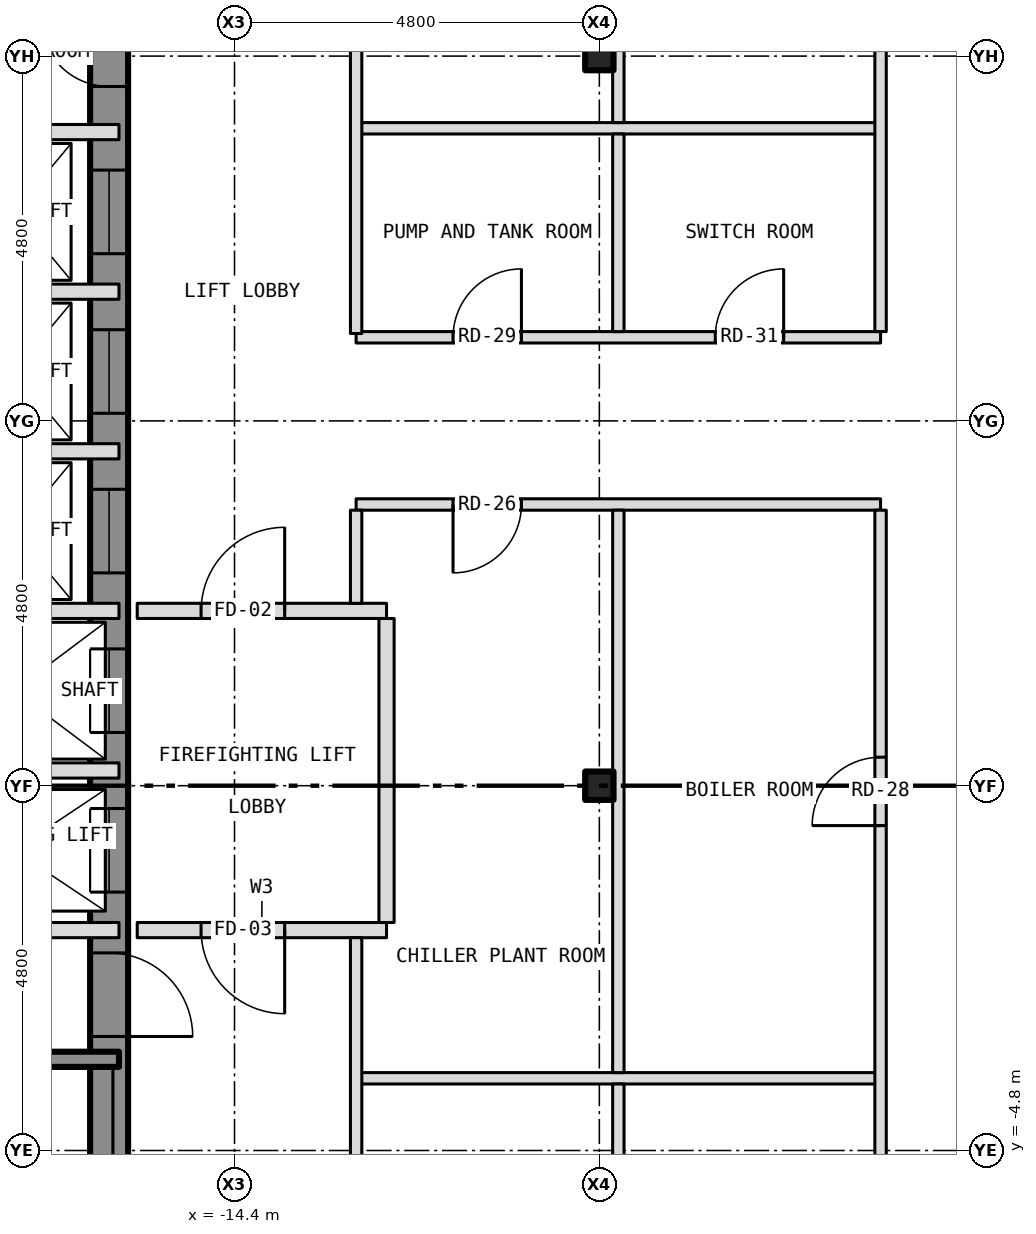
"""IFC4 building model, lengths in metres.
Left out: names, types, materials, properties, quantities, classifications, styles, units other than length and angle.
Written with IfcOpenShell. Run it as: python <this file> out.ifc"""

import sys

from ifc_helpers import new_model, si_unit, direction, frame, frame_2d, origin, origin_2d, place, context, subcontext, project, spatial, rectangle, i_section, extrude, element, fill, save


model = new_model("IFC4")
c1 = context("Model", 3, precision=1e-05, world=origin(), true_north=direction((0.0, 1.0)))
c2 = subcontext(c1, "Body", "Model", "MODEL_VIEW")
j1 = project(units=[si_unit("LENGTHUNIT", "METRE"), si_unit("PLANEANGLEUNIT", "RADIAN")], contexts=[c1])
p1 = place(None, origin())
s1 = spatial("IfcSite", under=j1, at=p1, CompositionType="ELEMENT")
p2 = place(p1, origin())
s2 = spatial("IfcBuilding", under=s1, at=p2, CompositionType="ELEMENT")
p3 = place(p2, frame((0.0, 0.0, 186.5)))
s3 = spatial("IfcBuildingStorey", under=s2, at=p3, CompositionType="ELEMENT", Elevation=186.5)
for number, where, z_axis, x_axis in (
    (1, (-9.6, 0.0, -0.3), (0.0, 0.0, 1.0), (1.0, 0.0, 0.0)),
    (2, (-9.6, 9.6, -0.3), (0.0, 0.0, 1.0), (1.0, 0.0, 0.0)),
):
    element("IfcColumn", number, at=place(p3, frame(where, z_axis=z_axis, x_axis=x_axis)), inside=s3, PredefinedType="COLUMN", context=c2, shape_type="SweptSolid", body=[
        extrude(i_section(OverallWidth=0.373, OverallDepth=0.373, WebThickness=0.016, FlangeThickness=0.026, at=origin_2d()), origin(), (0.0, 0.0, 1.0), 4.65),
    ])
p4 = place(p3, frame((-16.05, -10.8, 0.0), z_axis=(0.0, 0.0, 1.0), x_axis=(0.0, 1.0, 0.0)))
e3 = element("IfcWall", 3, at=p4, inside=s3, PredefinedType="SHEAR", context=c2, shape_type="SweptSolid", body=[
    extrude(rectangle(XDim=21.6, YDim=0.5, at=frame_2d((10.8, 0.0))), origin(), (0.0, 0.0, 1.0), 3.9),
])
p5 = place(p4, frame((9.4, 0.0, 0.0)))
e4 = element("IfcOpeningElement", 4, at=p5, cuts=e3, PredefinedType="OPENING", context=c2, shape_type="SweptSolid", body=[
    extrude(rectangle(XDim=1.1, YDim=2.1, at=frame_2d((0.55, 1.05))), frame((0.0, 0.262, 0.0), z_axis=(0.0, -1.0, 0.0), x_axis=(1.0, 0.0, 0.0)), (0.0, 0.0, 1.0), 0.524),
])
p6 = place(p4, frame((11.5, 0.0, 0.0)))
e5 = element("IfcOpeningElement", 5, at=p6, cuts=e3, PredefinedType="OPENING", context=c2, shape_type="SweptSolid", body=[
    extrude(rectangle(XDim=1.1, YDim=2.1, at=frame_2d((0.55, 1.05))), frame((0.0, 0.262, 0.0), z_axis=(0.0, -1.0, 0.0), x_axis=(1.0, 0.0, 0.0)), (0.0, 0.0, 1.0), 0.524),
])
p7 = place(p4, frame((13.6, 0.0, 0.0)))
e6 = element("IfcOpeningElement", 6, at=p7, cuts=e3, PredefinedType="OPENING", context=c2, shape_type="SweptSolid", body=[
    extrude(rectangle(XDim=1.1, YDim=2.1, at=frame_2d((0.55, 1.05))), frame((0.0, 0.262, 0.0), z_axis=(0.0, -1.0, 0.0), x_axis=(1.0, 0.0, 0.0)), (0.0, 0.0, 1.0), 0.524),
])
p8 = place(p4, frame((15.7, 0.0, 0.0)))
e7 = element("IfcOpeningElement", 7, at=p8, cuts=e3, PredefinedType="OPENING", context=c2, shape_type="SweptSolid", body=[
    extrude(rectangle(XDim=1.1, YDim=2.1, at=frame_2d((0.55, 1.05))), frame((0.0, 0.262, 0.0), z_axis=(0.0, -1.0, 0.0), x_axis=(1.0, 0.0, 0.0)), (0.0, 0.0, 1.0), 0.524),
])
p9 = place(p4, frame((17.8, 0.0, 0.0)))
e8 = element("IfcOpeningElement", 8, at=p9, cuts=e3, PredefinedType="OPENING", context=c2, shape_type="SweptSolid", body=[
    extrude(rectangle(XDim=1.1, YDim=2.1, at=frame_2d((0.55, 1.05))), frame((0.0, 0.262, 0.0), z_axis=(0.0, -1.0, 0.0), x_axis=(1.0, 0.0, 0.0)), (0.0, 0.0, 1.0), 0.524),
])
p10 = place(p4, frame((0.758, 0.0, 0.0)))
e9 = element("IfcOpeningElement", 9, at=p10, cuts=e3, PredefinedType="OPENING", context=c2, shape_type="SweptSolid", body=[
    extrude(rectangle(XDim=1.1, YDim=2.1, at=frame_2d((0.55, 1.05))), frame((0.0, 0.262, 0.0), z_axis=(0.0, -1.0, 0.0), x_axis=(1.0, 0.0, 0.0)), (0.0, 0.0, 1.0), 0.524),
])
p11 = place(p4, frame((7.5, 0.0, 0.0)))
e10 = element("IfcOpeningElement", 10, at=p11, cuts=e3, PredefinedType="OPENING", context=c2, shape_type="SweptSolid", body=[
    extrude(rectangle(XDim=1.1, YDim=2.1, at=frame_2d((0.55, 1.05))), frame((0.0, 0.262, 0.0), z_axis=(0.0, -1.0, 0.0), x_axis=(1.0, 0.0, 0.0)), (0.0, 0.0, 1.0), 0.524),
])
p12 = place(p4, frame((20.0, 0.0, 0.0)))
e11 = element("IfcOpeningElement", 11, at=p12, cuts=e3, PredefinedType="OPENING", context=c2, shape_type="SweptSolid", body=[
    extrude(rectangle(XDim=0.9, YDim=2.1, at=frame_2d((0.45, 1.05))), frame((0.0, 0.262, 0.0), z_axis=(0.0, -1.0, 0.0), x_axis=(1.0, 0.0, 0.0)), (0.0, 0.0, 1.0), 0.524),
])
p13 = place(p3, frame((-12.8, -3.85, 0.0), z_axis=(0.0, 0.0, 1.0), x_axis=(1.0, 0.0, 0.0)))
e12 = element("IfcWall", 12, at=p13, inside=s3, PredefinedType="PARTITIONING", context=c2, shape_type="SweptSolid", body=[
    extrude(rectangle(XDim=6.9, YDim=0.15, at=frame_2d((3.45, 0.0))), origin(), (0.0, 0.0, 1.0), 4.35),
])
p14 = place(p3, frame((-20.0, -3.6, 0.0), z_axis=(0.0, 0.0, 1.0), x_axis=(1.0, 0.0, 0.0)))
e13 = element("IfcWall", 13, at=p14, inside=s3, PredefinedType="SHEAR", context=c2, shape_type="SweptSolid", body=[
    extrude(rectangle(XDim=4.08, YDim=0.2, at=frame_2d((2.04, 0.0))), origin(), (0.0, 0.0, 1.0), 3.9),
])
p15 = place(p3, frame((-21.48, -1.9, 0.0), z_axis=(0.0, 0.0, 1.0), x_axis=(1.0, 0.0, 0.0)))
e14 = element("IfcWall", 14, at=p15, inside=s3, PredefinedType="PARTITIONING", context=c2, shape_type="SweptSolid", body=[
    extrude(rectangle(XDim=5.56, YDim=0.2, at=frame_2d((2.78, 0.0))), origin(), (0.0, 0.0, 1.0), 3.9),
])
p16 = place(p15, frame((0.83, 0.0, 0.0)))
e15 = element("IfcOpeningElement", 15, at=p16, cuts=e14, PredefinedType="OPENING", context=c2, shape_type="SweptSolid", body=[
    extrude(rectangle(XDim=0.9, YDim=2.1, at=frame_2d((0.45, 1.05))), frame((0.0, 0.112, 0.0), z_axis=(0.0, -1.0, 0.0), x_axis=(1.0, 0.0, 0.0)), (0.0, 0.0, 1.0), 0.224),
])
p17 = place(p3, frame((-15.68, -1.9, 0.0), z_axis=(0.0, 0.0, 1.0), x_axis=(1.0, 0.0, 0.0)))
e16 = element("IfcWall", 16, at=p17, inside=s3, PredefinedType="PARTITIONING", context=c2, shape_type="SweptSolid", body=[
    extrude(rectangle(XDim=3.28, YDim=0.2, at=frame_2d((1.64, 0.0))), origin(), (0.0, 0.0, 1.0), 4.35),
])
p18 = place(p17, frame((0.84, 0.0, 0.0)))
e17 = element("IfcOpeningElement", 17, at=p18, cuts=e16, PredefinedType="OPENING", context=c2, shape_type="SweptSolid", body=[
    extrude(rectangle(XDim=1.1, YDim=2.1, at=frame_2d((0.55, 1.05))), frame((0.0, 0.112, 0.0), z_axis=(0.0, -1.0, 0.0), x_axis=(1.0, 0.0, 0.0)), (0.0, 0.0, 1.0), 0.224),
])
for number, where, z_axis, x_axis in (
    (18, (-18.8, 0.2, 0.0), (0.0, 0.0, 1.0), (1.0, 0.0, 0.0)),
    (19, (-18.8, 2.3, 0.0), (0.0, 0.0, 1.0), (1.0, 0.0, 0.0)),
):
    element("IfcWall", number, at=place(p3, frame(where, z_axis=z_axis, x_axis=x_axis)), inside=s3, PredefinedType="PARTITIONING", context=c2, shape_type="SweptSolid", body=[
        extrude(rectangle(XDim=2.88, YDim=0.2, at=frame_2d((1.44, 0.0))), origin(), (0.0, 0.0, 1.0), 3.9),
    ])
p19 = place(p3, frame((-15.68, 2.3, 0.0), z_axis=(0.0, 0.0, 1.0), x_axis=(1.0, 0.0, 0.0)))
e20 = element("IfcWall", 20, at=p19, inside=s3, PredefinedType="PARTITIONING", context=c2, shape_type="SweptSolid", body=[
    extrude(rectangle(XDim=3.28, YDim=0.2, at=frame_2d((1.64, 0.0))), origin(), (0.0, 0.0, 1.0), 4.35),
])
p20 = place(p19, frame((0.84, 0.0, 0.0)))
e21 = element("IfcOpeningElement", 21, at=p20, cuts=e20, PredefinedType="OPENING", context=c2, shape_type="SweptSolid", body=[
    extrude(rectangle(XDim=1.1, YDim=2.1, at=frame_2d((0.55, 1.05))), frame((0.0, 0.112, 0.0), z_axis=(0.0, -1.0, 0.0), x_axis=(1.0, 0.0, 0.0)), (0.0, 0.0, 1.0), 0.224),
])
p21 = place(p3, frame((-12.8, 3.7, 0.0), z_axis=(0.0, 0.0, 1.0), x_axis=(1.0, 0.0, 0.0)))
e22 = element("IfcWall", 22, at=p21, inside=s3, PredefinedType="PARTITIONING", context=c2, shape_type="SweptSolid", body=[
    extrude(rectangle(XDim=6.9, YDim=0.15, at=frame_2d((3.45, 0.0))), origin(), (0.0, 0.0, 1.0), 4.35),
])
p22 = place(p21, frame((1.275, 0.0, 0.0)))
e23 = element("IfcOpeningElement", 23, at=p22, cuts=e22, PredefinedType="OPENING", context=c2, shape_type="SweptSolid", body=[
    extrude(rectangle(XDim=0.9, YDim=2.1, at=frame_2d((0.45, 1.05))), frame((0.0, 0.087, 0.0), z_axis=(0.0, -1.0, 0.0), x_axis=(1.0, 0.0, 0.0)), (0.0, 0.0, 1.0), 0.174),
])
p23 = place(p3, frame((-21.48, 4.4, 0.0), z_axis=(0.0, 0.0, 1.0), x_axis=(1.0, 0.0, 0.0)))
e24 = element("IfcWall", 24, at=p23, inside=s3, PredefinedType="PARTITIONING", context=c2, shape_type="SweptSolid", body=[
    extrude(rectangle(XDim=5.56, YDim=0.2, at=frame_2d((2.78, 0.0))), origin(), (0.0, 0.0, 1.0), 3.9),
])
p24 = place(p23, frame((0.83, 0.0, 0.0)))
e25 = element("IfcOpeningElement", 25, at=p24, cuts=e24, PredefinedType="OPENING", context=c2, shape_type="SweptSolid", body=[
    extrude(rectangle(XDim=0.9, YDim=2.1, at=frame_2d((0.45, 1.05))), frame((0.0, 0.112, 0.0), z_axis=(0.0, -1.0, 0.0), x_axis=(1.0, 0.0, 0.0)), (0.0, 0.0, 1.0), 0.224),
])
p25 = place(p3, frame((-12.8, 5.9, 0.0), z_axis=(0.0, 0.0, 1.0), x_axis=(1.0, 0.0, 0.0)))
e26 = element("IfcWall", 26, at=p25, inside=s3, PredefinedType="PARTITIONING", context=c2, shape_type="SweptSolid", body=[
    extrude(rectangle(XDim=6.9, YDim=0.15, at=frame_2d((3.45, 0.0))), origin(), (0.0, 0.0, 1.0), 4.35),
])
p26 = place(p25, frame((1.275, 0.0, 0.0)))
e27 = element("IfcOpeningElement", 27, at=p26, cuts=e26, PredefinedType="OPENING", context=c2, shape_type="SweptSolid", body=[
    extrude(rectangle(XDim=0.9, YDim=2.1, at=frame_2d((0.45, 1.05))), frame((0.0, 0.087, 0.0), z_axis=(0.0, -1.0, 0.0), x_axis=(1.0, 0.0, 0.0)), (0.0, 0.0, 1.0), 0.174),
])
p27 = place(p25, frame((4.725, 0.0, 0.0)))
e28 = element("IfcOpeningElement", 28, at=p27, cuts=e26, PredefinedType="OPENING", context=c2, shape_type="SweptSolid", body=[
    extrude(rectangle(XDim=0.9, YDim=2.1, at=frame_2d((0.45, 1.05))), frame((0.0, 0.087, 0.0), z_axis=(0.0, -1.0, 0.0), x_axis=(1.0, 0.0, 0.0)), (0.0, 0.0, 1.0), 0.174),
])
for number, where, z_axis, x_axis in (
    (29, (-18.8, 6.5, 0.0), (0.0, 0.0, 1.0), (1.0, 0.0, 0.0)),
    (30, (-18.8, 8.6, 0.0), (0.0, 0.0, 1.0), (1.0, 0.0, 0.0)),
):
    element("IfcWall", number, at=place(p3, frame(where, z_axis=z_axis, x_axis=x_axis)), inside=s3, PredefinedType="PARTITIONING", context=c2, shape_type="SweptSolid", body=[
        extrude(rectangle(XDim=2.88, YDim=0.2, at=frame_2d((1.44, 0.0))), origin(), (0.0, 0.0, 1.0), 3.9),
    ])
p28 = place(p3, frame((-12.8, 8.65, 0.0), z_axis=(0.0, 0.0, 1.0), x_axis=(1.0, 0.0, 0.0)))
e31 = element("IfcWall", 31, at=p28, inside=s3, PredefinedType="PARTITIONING", context=c2, shape_type="SweptSolid", body=[
    extrude(rectangle(XDim=6.9, YDim=0.15, at=frame_2d((3.45, 0.0))), origin(), (0.0, 0.0, 1.0), 4.35),
])
p29 = place(p3, frame((-12.8, -11.325, 0.0), z_axis=(0.0, 0.0, 1.0), x_axis=(0.0, 1.0, 0.0)))
e32 = element("IfcWall", 32, at=p29, inside=s3, PredefinedType="PARTITIONING", context=c2, shape_type="SweptSolid", body=[
    extrude(rectangle(XDim=9.325, YDim=0.15, at=frame_2d((4.663, 0.0))), origin(), (0.0, 0.0, 1.0), 4.35),
])
p30 = place(p29, frame((3.55, 0.0, 0.0)))
e33 = element("IfcOpeningElement", 33, at=p30, cuts=e32, PredefinedType="OPENING", context=c2, shape_type="SweptSolid", body=[
    extrude(rectangle(XDim=0.9, YDim=2.1, at=frame_2d((0.45, 1.05))), frame((0.0, 0.087, 0.0), z_axis=(0.0, -1.0, 0.0), x_axis=(1.0, 0.0, 0.0)), (0.0, 0.0, 1.0), 0.174),
])
p31 = place(p3, frame((-12.8, 2.4, 0.0), z_axis=(0.0, 0.0, 1.0), x_axis=(0.0, 1.0, 0.0)))
e34 = element("IfcWall", 34, at=p31, inside=s3, PredefinedType="PARTITIONING", context=c2, shape_type="SweptSolid", body=[
    extrude(rectangle(XDim=1.225, YDim=0.15, at=frame_2d((0.613, 0.0))), origin(), (0.0, 0.0, 1.0), 4.35),
])
p32 = place(p3, frame((-12.8, 5.95, 0.0), z_axis=(0.0, 0.0, 1.0), x_axis=(0.0, 1.0, 0.0)))
e35 = element("IfcWall", 35, at=p32, inside=s3, PredefinedType="PARTITIONING", context=c2, shape_type="SweptSolid", body=[
    extrude(rectangle(XDim=4.7, YDim=0.15, at=frame_2d((2.35, 0.0))), origin(), (0.0, 0.0, 1.0), 4.35),
])
p33 = place(p3, frame((-12.4, -1.8, 0.0), z_axis=(0.0, 0.0, 1.0), x_axis=(0.0, 1.0, 0.0)))
e36 = element("IfcWall", 36, at=p33, inside=s3, PredefinedType="PARTITIONING", context=c2, shape_type="SweptSolid", body=[
    extrude(rectangle(XDim=4.0, YDim=0.2, at=frame_2d((2.0, 0.0))), origin(), (0.0, 0.0, 1.0), 4.35),
])
for number, where, z_axis, x_axis in (
    (37, (-9.35, -11.325, 0.0), (0.0, 0.0, 1.0), (0.0, 1.0, 0.0)),
    (38, (-9.35, -3.775, 0.0), (0.0, 0.0, 1.0), (0.0, 1.0, 0.0)),
):
    element("IfcWall", number, at=place(p3, frame(where, z_axis=z_axis, x_axis=x_axis)), inside=s3, PredefinedType="PARTITIONING", context=c2, shape_type="SweptSolid", body=[
        extrude(rectangle(XDim=7.4, YDim=0.15, at=frame_2d((3.7, 0.0))), origin(), (0.0, 0.0, 1.0), 4.35),
    ])
for number, where, z_axis, x_axis in (
    (39, (-9.35, 5.975, 0.0), (0.0, 0.0, 1.0), (0.0, 1.0, 0.0)),
    (40, (-9.35, 8.725, 0.0), (0.0, 0.0, 1.0), (0.0, 1.0, 0.0)),
):
    element("IfcWall", number, at=place(p3, frame(where, z_axis=z_axis, x_axis=x_axis)), inside=s3, PredefinedType="PARTITIONING", context=c2, shape_type="SweptSolid", body=[
        extrude(rectangle(XDim=2.6, YDim=0.15, at=frame_2d((1.3, 0.0))), origin(), (0.0, 0.0, 1.0), 4.35),
    ])
p34 = place(p3, frame((-5.9, -11.325, 0.0), z_axis=(0.0, 0.0, 1.0), x_axis=(0.0, 1.0, 0.0)))
e41 = element("IfcWall", 41, at=p34, inside=s3, PredefinedType="PARTITIONING", context=c2, shape_type="SweptSolid", body=[
    extrude(rectangle(XDim=14.95, YDim=0.15, at=frame_2d((7.475, 0.0))), origin(), (0.0, 0.0, 1.0), 4.35),
])
p35 = place(p34, frame((3.25, 0.0, 0.0)))
e42 = element("IfcOpeningElement", 42, at=p35, cuts=e41, PredefinedType="OPENING", context=c2, shape_type="SweptSolid", body=[
    extrude(rectangle(XDim=0.9, YDim=2.1, at=frame_2d((0.45, 1.05))), frame((0.0, 0.087, 0.0), z_axis=(0.0, -1.0, 0.0), x_axis=(1.0, 0.0, 0.0)), (0.0, 0.0, 1.0), 0.174),
])
p36 = place(p34, frame((10.8, 0.0, 0.0)))
e43 = element("IfcOpeningElement", 43, at=p36, cuts=e41, PredefinedType="OPENING", context=c2, shape_type="SweptSolid", body=[
    extrude(rectangle(XDim=0.9, YDim=2.1, at=frame_2d((0.45, 1.05))), frame((0.0, 0.087, 0.0), z_axis=(0.0, -1.0, 0.0), x_axis=(1.0, 0.0, 0.0)), (0.0, 0.0, 1.0), 0.174),
])
p37 = place(p3, frame((-5.9, 5.975, 0.0), z_axis=(0.0, 0.0, 1.0), x_axis=(0.0, 1.0, 0.0)))
e44 = element("IfcWall", 44, at=p37, inside=s3, PredefinedType="PARTITIONING", context=c2, shape_type="SweptSolid", body=[
    extrude(rectangle(XDim=5.35, YDim=0.15, at=frame_2d((2.675, 0.0))), origin(), (0.0, 0.0, 1.0), 4.35),
])
p38 = place(p5, origin())
e45 = element("IfcDoor", 45, at=p38, inside=s3, OperationType="SLIDING_TO_LEFT", PredefinedType="DOOR", context=c2, shape_type="SweptSolid", body=[
    extrude(rectangle(XDim=1.1, YDim=2.1, at=frame_2d((0.55, 1.05))), frame((0.0, 0.025, 0.0), z_axis=(0.0, -1.0, 0.0), x_axis=(1.0, 0.0, 0.0)), (0.0, 0.0, 1.0), 0.05),
])
fill(e4, e45)
p39 = place(p6, origin())
e46 = element("IfcDoor", 46, at=p39, inside=s3, OperationType="SLIDING_TO_LEFT", PredefinedType="DOOR", context=c2, shape_type="SweptSolid", body=[
    extrude(rectangle(XDim=1.1, YDim=2.1, at=frame_2d((0.55, 1.05))), frame((0.0, 0.025, 0.0), z_axis=(0.0, -1.0, 0.0), x_axis=(1.0, 0.0, 0.0)), (0.0, 0.0, 1.0), 0.05),
])
fill(e5, e46)
p40 = place(p7, origin())
e47 = element("IfcDoor", 47, at=p40, inside=s3, OperationType="SLIDING_TO_LEFT", PredefinedType="DOOR", context=c2, shape_type="SweptSolid", body=[
    extrude(rectangle(XDim=1.1, YDim=2.1, at=frame_2d((0.55, 1.05))), frame((0.0, 0.025, 0.0), z_axis=(0.0, -1.0, 0.0), x_axis=(1.0, 0.0, 0.0)), (0.0, 0.0, 1.0), 0.05),
])
fill(e6, e47)
p41 = place(p8, origin())
e48 = element("IfcDoor", 48, at=p41, inside=s3, OperationType="SLIDING_TO_LEFT", PredefinedType="DOOR", context=c2, shape_type="SweptSolid", body=[
    extrude(rectangle(XDim=1.1, YDim=2.1, at=frame_2d((0.55, 1.05))), frame((0.0, 0.025, 0.0), z_axis=(0.0, -1.0, 0.0), x_axis=(1.0, 0.0, 0.0)), (0.0, 0.0, 1.0), 0.05),
])
fill(e7, e48)
p42 = place(p9, origin())
e49 = element("IfcDoor", 49, at=p42, inside=s3, OperationType="SLIDING_TO_LEFT", PredefinedType="DOOR", context=c2, shape_type="SweptSolid", body=[
    extrude(rectangle(XDim=1.1, YDim=2.1, at=frame_2d((0.55, 1.05))), frame((0.0, 0.025, 0.0), z_axis=(0.0, -1.0, 0.0), x_axis=(1.0, 0.0, 0.0)), (0.0, 0.0, 1.0), 0.05),
])
fill(e8, e49)
p43 = place(p11, origin())
e50 = element("IfcDoor", 50, at=p43, inside=s3, OperationType="SINGLE_SWING_LEFT", PredefinedType="DOOR", context=c2, shape_type="SweptSolid", body=[
    extrude(rectangle(XDim=1.1, YDim=2.1, at=frame_2d((0.55, 1.05))), frame((0.0, 0.025, 0.0), z_axis=(0.0, -1.0, 0.0), x_axis=(1.0, 0.0, 0.0)), (0.0, 0.0, 1.0), 0.05),
])
fill(e10, e50)
p44 = place(p12, origin())
e51 = element("IfcDoor", 51, at=p44, inside=s3, OperationType="SINGLE_SWING_RIGHT", PredefinedType="DOOR", context=c2, shape_type="SweptSolid", body=[
    extrude(rectangle(XDim=0.9, YDim=2.1, at=frame_2d((0.45, 1.05))), frame((0.0, 0.025, 0.0), z_axis=(0.0, -1.0, 0.0), x_axis=(1.0, 0.0, 0.0)), (0.0, 0.0, 1.0), 0.05),
])
fill(e11, e51)
p45 = place(p20, origin())
e52 = element("IfcDoor", 52, at=p45, inside=s3, OperationType="SINGLE_SWING_RIGHT", PredefinedType="DOOR", context=c2, shape_type="SweptSolid", body=[
    extrude(rectangle(XDim=1.1, YDim=2.1, at=frame_2d((0.55, 1.05))), frame((0.0, 0.025, 0.0), z_axis=(0.0, -1.0, 0.0), x_axis=(1.0, 0.0, 0.0)), (0.0, 0.0, 1.0), 0.05),
])
fill(e21, e52)
p46 = place(p18, origin())
e53 = element("IfcDoor", 53, at=p46, inside=s3, OperationType="SINGLE_SWING_RIGHT", PredefinedType="DOOR", context=c2, shape_type="SweptSolid", body=[
    extrude(rectangle(XDim=1.1, YDim=2.1, at=frame_2d((0.55, 1.05))), frame((0.0, 0.025, 0.0), z_axis=(0.0, -1.0, 0.0), x_axis=(1.0, 0.0, 0.0)), (0.0, 0.0, 1.0), 0.05),
])
fill(e17, e53)
p47 = place(p22, origin())
e54 = element("IfcDoor", 54, at=p47, inside=s3, OperationType="SINGLE_SWING_LEFT", PredefinedType="DOOR", context=c2, shape_type="SweptSolid", body=[
    extrude(rectangle(XDim=0.9, YDim=2.1, at=frame_2d((0.45, 1.05))), frame((0.0, 0.025, 0.0), z_axis=(0.0, -1.0, 0.0), x_axis=(1.0, 0.0, 0.0)), (0.0, 0.0, 1.0), 0.05),
])
fill(e23, e54)
p48 = place(p36, origin())
e55 = element("IfcDoor", 55, at=p48, inside=s3, OperationType="SINGLE_SWING_LEFT", PredefinedType="DOOR", context=c2, shape_type="SweptSolid", body=[
    extrude(rectangle(XDim=0.9, YDim=2.1, at=frame_2d((0.45, 1.05))), frame((0.0, 0.025, 0.0), z_axis=(0.0, -1.0, 0.0), x_axis=(1.0, 0.0, 0.0)), (0.0, 0.0, 1.0), 0.05),
])
fill(e43, e55)
p49 = place(p26, origin())
e56 = element("IfcDoor", 56, at=p49, inside=s3, OperationType="SINGLE_SWING_RIGHT", PredefinedType="DOOR", context=c2, shape_type="SweptSolid", body=[
    extrude(rectangle(XDim=0.9, YDim=2.1, at=frame_2d((0.45, 1.05))), frame((0.0, 0.025, 0.0), z_axis=(0.0, -1.0, 0.0), x_axis=(1.0, 0.0, 0.0)), (0.0, 0.0, 1.0), 0.05),
])
fill(e27, e56)
p50 = place(p27, origin())
e57 = element("IfcDoor", 57, at=p50, inside=s3, OperationType="SINGLE_SWING_RIGHT", PredefinedType="DOOR", context=c2, shape_type="SweptSolid", body=[
    extrude(rectangle(XDim=0.9, YDim=2.1, at=frame_2d((0.45, 1.05))), frame((0.0, 0.025, 0.0), z_axis=(0.0, -1.0, 0.0), x_axis=(1.0, 0.0, 0.0)), (0.0, 0.0, 1.0), 0.05),
])
fill(e28, e57)
save(model, sys.argv[1])
